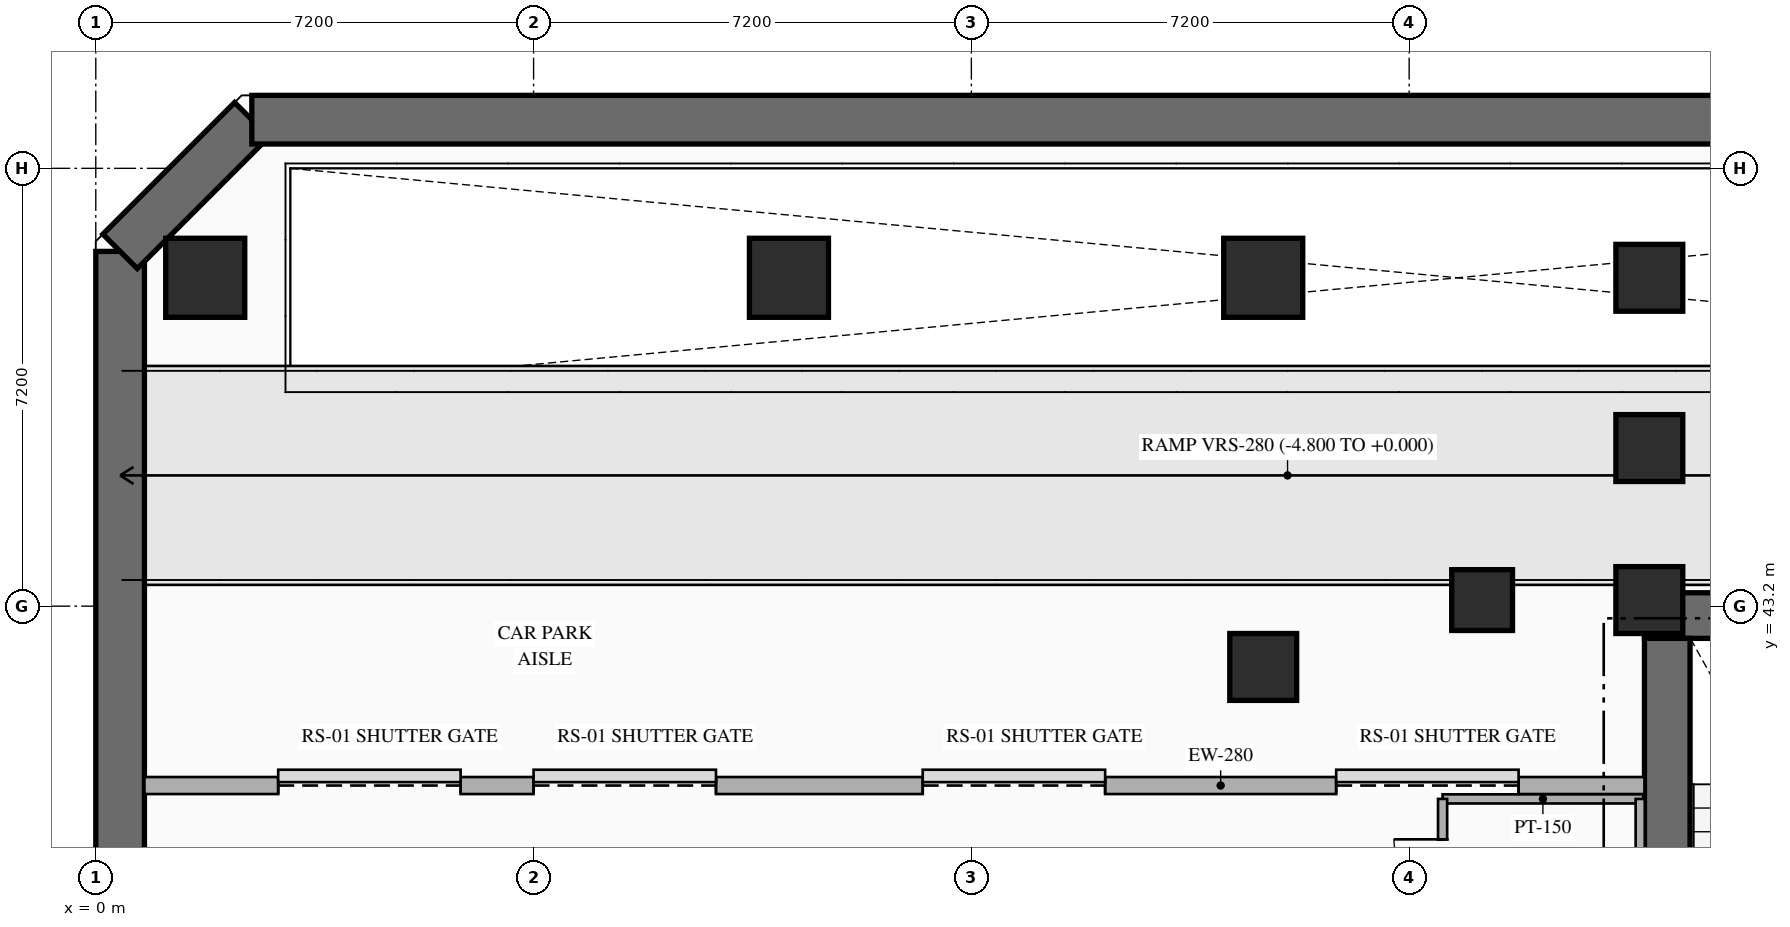
"""IFC4 building model, lengths in metres.
Left out: names, types, materials, properties, quantities, classifications, styles, units other than length and angle.
Written with IfcOpenShell. Run it as: python <this file> out.ifc"""

import sys

from ifc_helpers import new_model, si_unit, direction, frame, frame_2d, origin, origin_2d, place, context, subcontext, project, spatial, rectangle, hollow_rectangle, extrude, element, fill, save


model = new_model("IFC4")
c1 = context("Model", 3, precision=1e-05, world=origin(), true_north=direction((0.0, 1.0)))
c2 = subcontext(c1, "Body", "Model", "MODEL_VIEW")
j1 = project(units=[si_unit("LENGTHUNIT", "METRE"), si_unit("PLANEANGLEUNIT", "RADIAN")], contexts=[c1])
p1 = place(None, origin())
s1 = spatial("IfcSite", under=j1, at=p1, CompositionType="ELEMENT")
p2 = place(p1, origin())
s2 = spatial("IfcBuilding", under=s1, at=p2, CompositionType="ELEMENT")
p3 = place(p2, frame((0.0, 0.0, -4.8)))
s3 = spatial("IfcBuildingStorey", under=s2, at=p3, CompositionType="ELEMENT", Elevation=-4.8)
p4 = place(p3, frame((25.47, 43.045, 0.0), z_axis=(0.0, 0.0, 1.0), x_axis=(1.0, 0.0, 0.0)))
e1 = element("IfcWall", 1, at=p4, inside=s3, PredefinedType="SHEAR", context=c2, shape_type="SweptSolid", body=[
    extrude(rectangle(XDim=8.08, YDim=0.75, at=frame_2d((4.04, 0.0))), origin(), (0.0, 0.0, 1.0), 4.8),
])
p5 = place(p3, frame((25.845, 33.19, 0.0), z_axis=(0.0, 0.0, 1.0), x_axis=(0.0, 1.0, 0.0)))
e2 = element("IfcWall", 2, at=p5, inside=s3, PredefinedType="SHEAR", context=c2, shape_type="SweptSolid", body=[
    extrude(rectangle(XDim=9.48, YDim=0.75, at=frame_2d((4.74, 0.0))), origin(), (0.0, 0.0, 1.0), 4.8),
])
p6 = place(p3, frame((0.4, 25.966, 0.0), z_axis=(0.0, 0.0, 1.0), x_axis=(0.0, 1.0, 0.0)))
e3 = element("IfcWall", 3, at=p6, inside=s3, PredefinedType="SHEAR", context=c2, shape_type="SweptSolid", body=[
    extrude(rectangle(XDim=23.068, YDim=0.8, at=frame_2d((11.534, 0.0))), origin(), (0.0, 0.0, 1.0), 4.5),
])
p7 = place(p3, frame((0.4, 49.034, 0.0), z_axis=(0.0, 0.0, 1.0), x_axis=(0.707106781187, 0.707106781187, 0.0)))
e4 = element("IfcWall", 4, at=p7, inside=s3, PredefinedType="SHEAR", context=c2, shape_type="SweptSolid", body=[
    extrude(rectangle(XDim=3.063, YDim=0.8, at=frame_2d((1.532, 0.0))), origin(), (0.0, 0.0, 1.0), 4.5),
])
p8 = place(p3, frame((2.566, 51.2, 0.0), z_axis=(0.0, 0.0, 1.0), x_axis=(1.0, 0.0, 0.0)))
e5 = element("IfcWall", 5, at=p8, inside=s3, PredefinedType="SHEAR", context=c2, shape_type="SweptSolid", body=[
    extrude(rectangle(XDim=39.868, YDim=0.8, at=frame_2d((19.934, 0.0))), origin(), (0.0, 0.0, 1.0), 4.5),
])
p9 = place(p3, frame((25.55, 43.3, 0.0), z_axis=(0.0, 0.0, 1.0), x_axis=(1.0, 0.0, 0.0)))
e6 = element("IfcColumn", 6, at=p9, inside=s3, PredefinedType="COLUMN", context=c2, shape_type="SweptSolid", body=[
    extrude(rectangle(XDim=1.1, YDim=1.1, at=origin_2d()), origin(), (0.0, 0.0, 1.0), 4.8),
])
p10 = place(p3, frame((25.55, 45.8, 0.0), z_axis=(0.0, 0.0, 1.0), x_axis=(1.0, 0.0, 0.0)))
e7 = element("IfcColumn", 7, at=p10, inside=s3, PredefinedType="COLUMN", context=c2, shape_type="SweptSolid", body=[
    extrude(hollow_rectangle(XDim=1.1, YDim=1.1, WallThickness=0.04, at=origin_2d()), origin(), (0.0, 0.0, 1.0), 4.8),
])
for number, where, z_axis, x_axis in (
    (8, (1.8, 48.6, 0.0), (0.0, 0.0, 1.0), (1.0, 0.0, 0.0)),
    (9, (11.4, 48.6, 0.0), (0.0, 0.0, 1.0), (1.0, 0.0, 0.0)),
    (10, (19.2, 48.6, 0.0), (0.0, 0.0, 1.0), (1.0, 0.0, 0.0)),
):
    element("IfcColumn", number, at=place(p3, frame(where, z_axis=z_axis, x_axis=x_axis)), inside=s3, PredefinedType="COLUMN", context=c2, shape_type="SweptSolid", body=[
        extrude(rectangle(XDim=1.3, YDim=1.3, at=origin_2d()), origin(), (0.0, 0.0, 1.0), 4.8),
    ])
for number, where, z_axis, x_axis in (
    (11, (25.55, 48.6, 0.0), (0.0, 0.0, 1.0), (1.0, 0.0, 0.0)),
    (12, (19.2, 42.2, 0.0), (0.0, 0.0, 1.0), (1.0, 0.0, 0.0)),
):
    element("IfcColumn", number, at=place(p3, frame(where, z_axis=z_axis, x_axis=x_axis)), inside=s3, PredefinedType="COLUMN", context=c2, shape_type="SweptSolid", body=[
        extrude(hollow_rectangle(XDim=1.1, YDim=1.1, WallThickness=0.04, at=origin_2d()), origin(), (0.0, 0.0, 1.0), 4.8),
    ])
p11 = place(p3, frame((22.8, 43.3, 0.0), z_axis=(0.0, 0.0, 1.0), x_axis=(1.0, 0.0, 0.0)))
e13 = element("IfcColumn", 13, at=p11, inside=s3, PredefinedType="COLUMN", context=c2, shape_type="SweptSolid", body=[
    extrude(hollow_rectangle(XDim=1.0, YDim=1.0, WallThickness=0.038, at=origin_2d()), origin(), (0.0, 0.0, 1.0), 4.8),
])
p12 = place(p3, frame((0.8, 40.25, 0.0), z_axis=(0.0, 0.0, 1.0), x_axis=(1.0, 0.0, 0.0)))
e14 = element("IfcWall", 14, at=p12, inside=s3, PredefinedType="STANDARD", context=c2, shape_type="SweptSolid", body=[
    extrude(rectangle(XDim=24.67, YDim=0.28, at=frame_2d((12.335, 0.0))), origin(), (0.0, 0.0, 1.0), 3.5),
])
p13 = place(p12, frame((2.2, 0.0, 0.0)))
e15 = element("IfcOpeningElement", 15, at=p13, cuts=e14, PredefinedType="OPENING", context=c2, shape_type="SweptSolid", body=[
    extrude(rectangle(XDim=3.0, YDim=2.8, at=frame_2d((1.5, 1.4))), frame((0.0, 0.15, 0.0), z_axis=(0.0, -1.0, 0.0), x_axis=(1.0, 0.0, 0.0)), (0.0, 0.0, 1.0), 0.3),
])
p14 = place(p12, frame((6.4, 0.0, 0.0)))
e16 = element("IfcOpeningElement", 16, at=p14, cuts=e14, PredefinedType="OPENING", context=c2, shape_type="SweptSolid", body=[
    extrude(rectangle(XDim=3.0, YDim=2.8, at=frame_2d((1.5, 1.4))), frame((0.0, 0.15, 0.0), z_axis=(0.0, -1.0, 0.0), x_axis=(1.0, 0.0, 0.0)), (0.0, 0.0, 1.0), 0.3),
])
p15 = place(p12, frame((12.8, 0.0, 0.0)))
e17 = element("IfcOpeningElement", 17, at=p15, cuts=e14, PredefinedType="OPENING", context=c2, shape_type="SweptSolid", body=[
    extrude(rectangle(XDim=3.0, YDim=2.8, at=frame_2d((1.5, 1.4))), frame((0.0, 0.15, 0.0), z_axis=(0.0, -1.0, 0.0), x_axis=(1.0, 0.0, 0.0)), (0.0, 0.0, 1.0), 0.3),
])
p16 = place(p12, frame((19.6, 0.0, 0.0)))
e18 = element("IfcOpeningElement", 18, at=p16, cuts=e14, PredefinedType="OPENING", context=c2, shape_type="SweptSolid", body=[
    extrude(rectangle(XDim=3.0, YDim=2.8, at=frame_2d((1.5, 1.4))), frame((0.0, 0.15, 0.0), z_axis=(0.0, -1.0, 0.0), x_axis=(1.0, 0.0, 0.0)), (0.0, 0.0, 1.0), 0.3),
])
p17 = place(p3, frame((22.15, 40.03, 0.0), z_axis=(0.0, 0.0, 1.0), x_axis=(1.0, 0.0, 0.0)))
e19 = element("IfcWall", 19, at=p17, inside=s3, PredefinedType="PARTITIONING", context=c2, shape_type="SweptSolid", body=[
    extrude(rectangle(XDim=3.3, YDim=0.15, at=frame_2d((1.65, 0.0))), origin(), (0.0, 0.0, 1.0), 4.5),
])
p18 = place(p3, frame((25.4, 33.5, 0.0), z_axis=(0.0, 0.0, 1.0), x_axis=(0.0, 1.0, 0.0)))
e20 = element("IfcWall", 20, at=p18, inside=s3, PredefinedType="PARTITIONING", context=c2, shape_type="SweptSolid", body=[
    extrude(rectangle(XDim=6.53, YDim=0.15, at=frame_2d((3.265, 0.0))), origin(), (0.0, 0.0, 1.0), 4.5),
])
p19 = place(p3, frame((22.15, 37.9, 0.0), z_axis=(0.0, 0.0, 1.0), x_axis=(0.0, 1.0, 0.0)))
e21 = element("IfcWall", 21, at=p19, inside=s3, PredefinedType="PARTITIONING", context=c2, shape_type="SweptSolid", body=[
    extrude(rectangle(XDim=2.13, YDim=0.15, at=frame_2d((1.065, 0.0))), origin(), (0.0, 0.0, 1.0), 4.5),
])
p20 = place(p19, frame((0.665, 0.0, 0.0)))
e22 = element("IfcOpeningElement", 22, at=p20, cuts=e21, PredefinedType="OPENING", context=c2, shape_type="SweptSolid", body=[
    extrude(rectangle(XDim=0.8, YDim=2.06, at=frame_2d((0.4, 1.03))), frame((0.0, 0.085, 0.0), z_axis=(0.0, -1.0, 0.0), x_axis=(1.0, 0.0, 0.0)), (0.0, 0.0, 1.0), 0.17),
])
p21 = place(p13, origin())
e23 = element("IfcDoor", 23, at=p21, inside=s3, OperationType="ROLLINGUP", PredefinedType="TRAPDOOR", context=c2, shape_type="SweptSolid", body=[
    extrude(rectangle(XDim=3.0, YDim=2.8, at=frame_2d((1.5, 1.4))), frame((0.0, 0.025, 0.0), z_axis=(0.0, -1.0, 0.0), x_axis=(1.0, 0.0, 0.0)), (0.0, 0.0, 1.0), 0.05),
])
fill(e15, e23)
p22 = place(p14, origin())
e24 = element("IfcDoor", 24, at=p22, inside=s3, OperationType="ROLLINGUP", PredefinedType="TRAPDOOR", context=c2, shape_type="SweptSolid", body=[
    extrude(rectangle(XDim=3.0, YDim=2.8, at=frame_2d((1.5, 1.4))), frame((0.0, 0.025, 0.0), z_axis=(0.0, -1.0, 0.0), x_axis=(1.0, 0.0, 0.0)), (0.0, 0.0, 1.0), 0.05),
])
fill(e16, e24)
p23 = place(p15, origin())
e25 = element("IfcDoor", 25, at=p23, inside=s3, OperationType="ROLLINGUP", PredefinedType="TRAPDOOR", context=c2, shape_type="SweptSolid", body=[
    extrude(rectangle(XDim=3.0, YDim=2.8, at=frame_2d((1.5, 1.4))), frame((0.0, 0.025, 0.0), z_axis=(0.0, -1.0, 0.0), x_axis=(1.0, 0.0, 0.0)), (0.0, 0.0, 1.0), 0.05),
])
fill(e17, e25)
p24 = place(p16, origin())
e26 = element("IfcDoor", 26, at=p24, inside=s3, OperationType="ROLLINGUP", PredefinedType="TRAPDOOR", context=c2, shape_type="SweptSolid", body=[
    extrude(rectangle(XDim=3.0, YDim=2.8, at=frame_2d((1.5, 1.4))), frame((0.0, 0.025, 0.0), z_axis=(0.0, -1.0, 0.0), x_axis=(1.0, 0.0, 0.0)), (0.0, 0.0, 1.0), 0.05),
])
fill(e18, e26)
p25 = place(p20, origin())
e27 = element("IfcDoor", 27, at=p25, inside=s3, OperationType="SINGLE_SWING_RIGHT", PredefinedType="DOOR", context=c2, shape_type="SweptSolid", body=[
    extrude(rectangle(XDim=0.8, YDim=2.06, at=frame_2d((0.4, 1.03))), frame((0.0, 0.025, 0.0), z_axis=(0.0, -1.0, 0.0), x_axis=(1.0, 0.0, 0.0)), (0.0, 0.0, 1.0), 0.05),
])
fill(e22, e27)
save(model, sys.argv[1])
